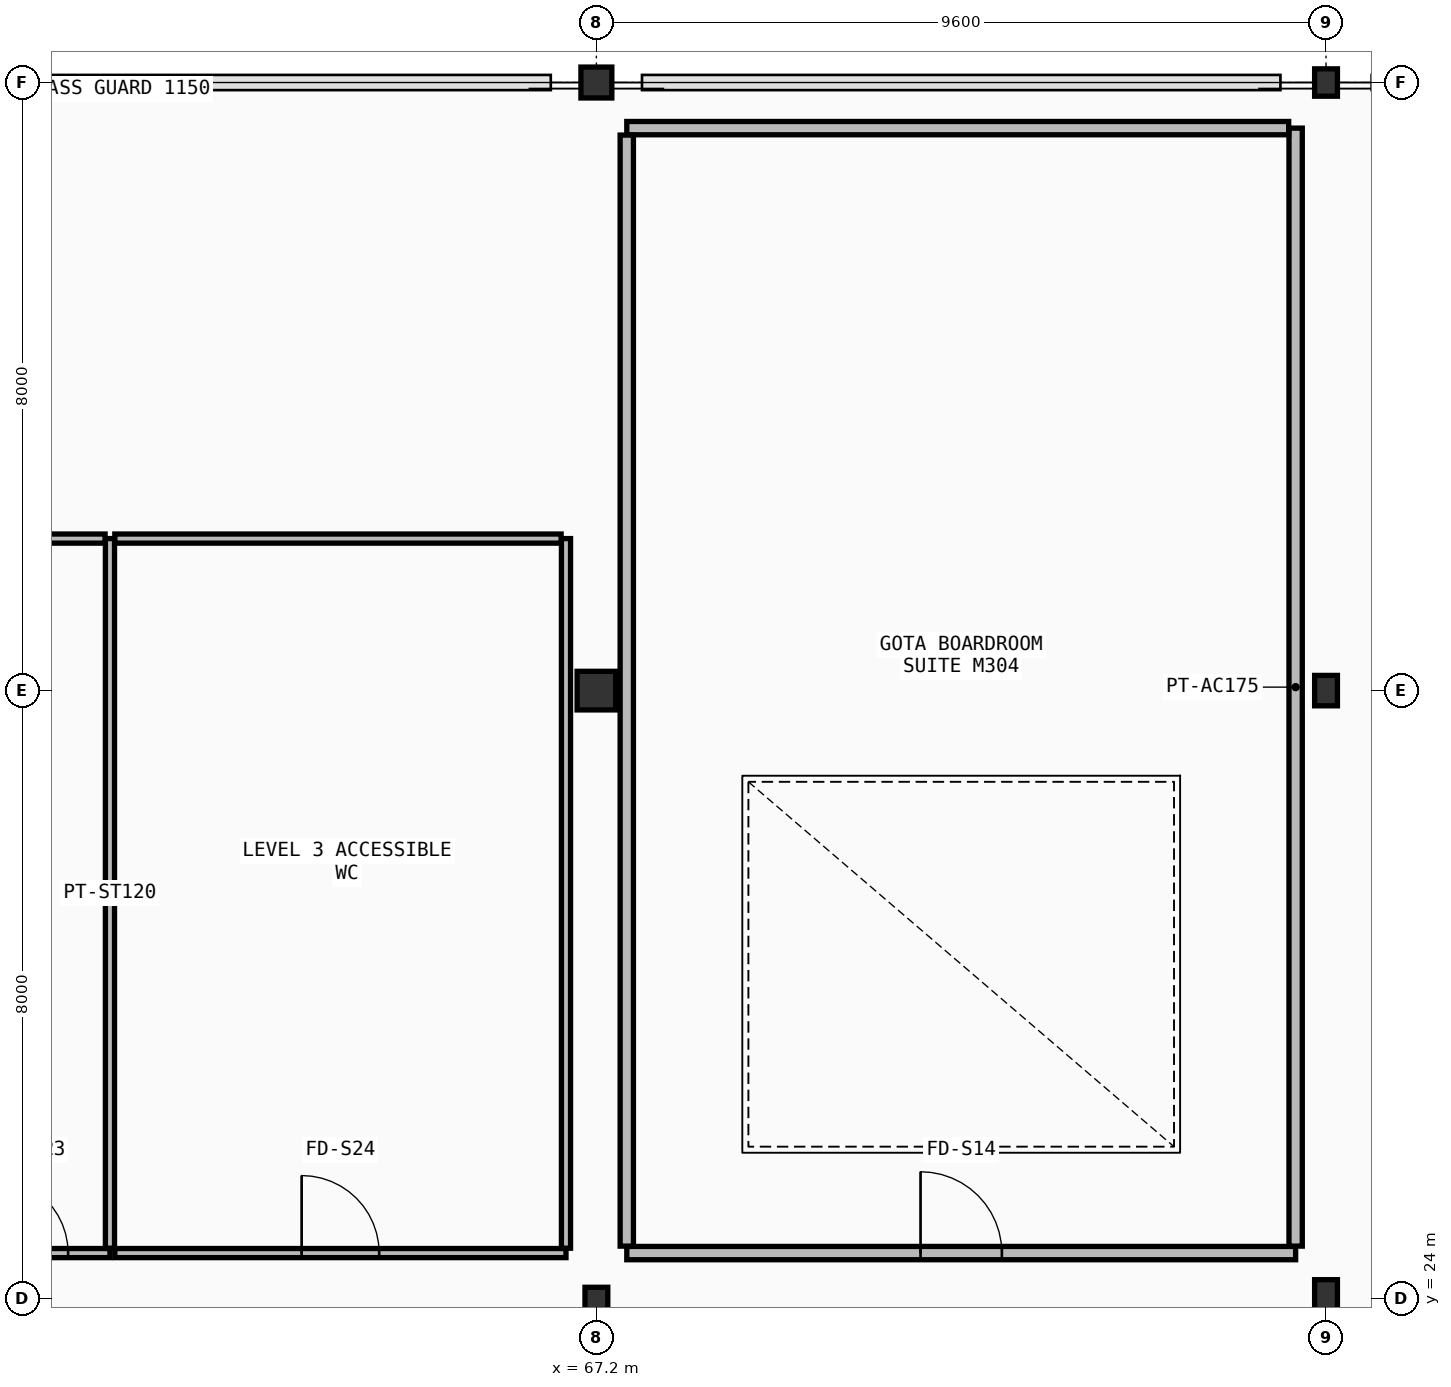
"""IFC4 building model, lengths in metres.
Left out: names, types, materials, properties, quantities, classifications, styles, units other than length and angle.
Written with IfcOpenShell. Run it as: python <this file> out.ifc"""

import sys

from ifc_helpers import new_model, si_unit, direction, frame, frame_2d, origin, origin_2d, place, context, subcontext, project, spatial, rectangle, hollow_circle, i_section, extrude, element, fill, save


model = new_model("IFC4")
c1 = context("Model", 3, precision=1e-05, world=origin(), true_north=direction((0.0, 1.0)))
c2 = subcontext(c1, "Body", "Model", "MODEL_VIEW")
j1 = project(units=[si_unit("LENGTHUNIT", "METRE"), si_unit("PLANEANGLEUNIT", "RADIAN")], contexts=[c1])
p1 = place(None, origin())
s1 = spatial("IfcSite", under=j1, at=p1, CompositionType="ELEMENT")
p2 = place(p1, origin())
s2 = spatial("IfcBuilding", under=s1, at=p2, CompositionType="ELEMENT")
p3 = place(p2, frame((0.0, 0.0, 15.9)))
s3 = spatial("IfcBuildingStorey", under=s2, at=p3, CompositionType="ELEMENT", Elevation=15.9)
p4 = place(p3, frame((67.2, 24.0, 0.0), z_axis=(0.0, 0.0, 1.0), x_axis=(1.0, 0.0, 0.0)))
e1 = element("IfcColumn", 1, at=p4, inside=s3, PredefinedType="COLUMN", context=c2, shape_type="SweptSolid", body=[
    extrude(i_section(OverallWidth=0.3, OverallDepth=0.3, WebThickness=0.011, FlangeThickness=0.019, FilletRadius=0.027, at=origin_2d()), origin(), (0.0, 0.0, 1.0), 4.5),
])
p5 = place(p3, frame((67.2, 32.0, 0.0), z_axis=(0.0, 0.0, 1.0), x_axis=(1.0, 0.0, 0.0)))
e2 = element("IfcColumn", 2, at=p5, inside=s3, PredefinedType="COLUMN", context=c2, shape_type="SweptSolid", body=[
    extrude(hollow_circle(Radius=0.254, WallThickness=0.025, at=origin_2d()), origin(), (0.0, 0.0, 1.0), 4.5),
])
p6 = place(p3, frame((67.2, 40.0, 0.0), z_axis=(0.0, 0.0, 1.0), x_axis=(1.0, 0.0, 0.0)))
e3 = element("IfcColumn", 3, at=p6, inside=s3, PredefinedType="COLUMN", context=c2, shape_type="SweptSolid", body=[
    extrude(hollow_circle(Radius=0.203, WallThickness=0.02, at=origin_2d()), origin(), (0.0, 0.0, 1.0), 4.5),
])
p7 = place(p3, frame((76.8, 24.0, 0.0), z_axis=(0.0, 0.0, 1.0), x_axis=(1.0, 0.0, 0.0)))
e4 = element("IfcColumn", 4, at=p7, inside=s3, PredefinedType="COLUMN", context=c2, shape_type="SweptSolid", body=[
    extrude(i_section(OverallWidth=0.3, OverallDepth=0.5, WebThickness=0.014, FlangeThickness=0.028, FilletRadius=0.027, at=origin_2d()), origin(), (0.0, 0.0, 1.0), 4.5),
])
p8 = place(p3, frame((76.8, 32.0, 0.0), z_axis=(0.0, 0.0, 1.0), x_axis=(1.0, 0.0, 0.0)))
e5 = element("IfcColumn", 5, at=p8, inside=s3, PredefinedType="COLUMN", context=c2, shape_type="SweptSolid", body=[
    extrude(i_section(OverallWidth=0.3, OverallDepth=0.4, WebThickness=0.013, FlangeThickness=0.024, FilletRadius=0.027, at=origin_2d()), origin(), (0.0, 0.0, 1.0), 4.5),
])
p9 = place(p3, frame((76.8, 40.0, 0.0), z_axis=(0.0, 0.0, 1.0), x_axis=(1.0, 0.0, 0.0)))
e6 = element("IfcColumn", 6, at=p9, inside=s3, PredefinedType="COLUMN", context=c2, shape_type="SweptSolid", body=[
    extrude(i_section(OverallWidth=0.3, OverallDepth=0.36, WebThickness=0.012, FlangeThickness=0.022, FilletRadius=0.027, at=origin_2d()), origin(), (0.0, 0.0, 1.0), 4.5),
])
p10 = place(p3, frame((67.6, 24.6, 0.0), z_axis=(0.0, 0.0, 1.0), x_axis=(1.0, 0.0, 0.0)))
e7 = element("IfcWall", 7, at=p10, inside=s3, PredefinedType="PARTITIONING", context=c2, shape_type="SweptSolid", body=[
    extrude(rectangle(XDim=8.8, YDim=0.175, at=frame_2d((4.4, 0.0))), origin(), (0.0, 0.0, 1.0), 4.276),
])
p11 = place(p10, frame((3.865, 0.0, 0.0)))
e8 = element("IfcOpeningElement", 8, at=p11, cuts=e7, PredefinedType="OPENING", context=c2, shape_type="SweptSolid", body=[
    extrude(rectangle(XDim=1.07, YDim=2.26, at=frame_2d((0.535, 1.13))), frame((0.0, 0.097, 0.0), z_axis=(0.0, -1.0, 0.0), x_axis=(1.0, 0.0, 0.0)), (0.0, 0.0, 1.0), 0.195),
])
p12 = place(p3, frame((76.4, 24.691, 0.0), z_axis=(0.0, 0.0, 1.0), x_axis=(0.0, 1.0, 0.0)))
e9 = element("IfcWall", 9, at=p12, inside=s3, PredefinedType="PARTITIONING", context=c2, shape_type="SweptSolid", body=[
    extrude(rectangle(XDim=14.708, YDim=0.175, at=frame_2d((7.354, 0.0))), origin(), (0.0, 0.0, 1.0), 3.746),
])
p13 = place(p3, frame((76.309, 39.4, 0.0), z_axis=(0.0, 0.0, 1.0), x_axis=(-1.0, 0.0, 0.0)))
e10 = element("IfcWall", 10, at=p13, inside=s3, PredefinedType="PARTITIONING", context=c2, shape_type="SweptSolid", body=[
    extrude(rectangle(XDim=8.708, YDim=0.175, at=frame_2d((4.354, 0.0))), origin(), (0.0, 0.0, 1.0), 4.276),
])
p14 = place(p3, frame((67.6, 39.309, 0.0), z_axis=(0.0, 0.0, 1.0), x_axis=(0.0, -1.0, 0.0)))
e11 = element("IfcWall", 11, at=p14, inside=s3, PredefinedType="PARTITIONING", context=c2, shape_type="SweptSolid", body=[
    extrude(rectangle(XDim=14.617, YDim=0.175, at=frame_2d((7.309, 0.0))), origin(), (0.0, 0.0, 1.0), 3.746),
])
p15 = place(p3, frame((54.546, 24.6, 0.0), z_axis=(0.0, 0.0, 1.0), x_axis=(1.0, 0.0, 0.0)))
e12 = element("IfcWall", 12, at=p15, inside=s3, PredefinedType="PARTITIONING", context=c2, shape_type="SweptSolid", body=[
    extrude(rectangle(XDim=6.254, YDim=0.12, at=frame_2d((3.127, 0.0))), origin(), (0.0, 0.0, 1.0), 3.646),
])
p16 = place(p15, frame((4.713, 0.0, 0.0)))
e13 = element("IfcOpeningElement", 13, at=p16, cuts=e12, PredefinedType="OPENING", context=c2, shape_type="SweptSolid", body=[
    extrude(rectangle(XDim=0.99, YDim=2.28, at=frame_2d((0.495, 1.14))), frame((0.0, 0.07, 0.0), z_axis=(0.0, -1.0, 0.0), x_axis=(1.0, 0.0, 0.0)), (0.0, 0.0, 1.0), 0.14),
])
p17 = place(p3, frame((60.8, 24.664, 0.0), z_axis=(0.0, 0.0, 1.0), x_axis=(0.0, 1.0, 0.0)))
e14 = element("IfcWall", 14, at=p17, inside=s3, PredefinedType="PARTITIONING", context=c2, shape_type="SweptSolid", body=[
    extrude(rectangle(XDim=9.336, YDim=0.12, at=frame_2d((4.668, 0.0))), origin(), (0.0, 0.0, 1.0), 3.696),
])
p18 = place(p3, frame((60.736, 34.0, 0.0), z_axis=(0.0, 0.0, 1.0), x_axis=(-1.0, 0.0, 0.0)))
e15 = element("IfcWall", 15, at=p18, inside=s3, PredefinedType="PARTITIONING", context=c2, shape_type="SweptSolid", body=[
    extrude(rectangle(XDim=6.19, YDim=0.12, at=frame_2d((3.095, 0.0))), origin(), (0.0, 0.0, 1.0), 3.746),
])
p19 = place(p3, frame((60.864, 24.6, 0.0), z_axis=(0.0, 0.0, 1.0), x_axis=(1.0, 0.0, 0.0)))
e16 = element("IfcWall", 16, at=p19, inside=s3, PredefinedType="PARTITIONING", context=c2, shape_type="SweptSolid", body=[
    extrude(rectangle(XDim=5.936, YDim=0.12, at=frame_2d((2.968, 0.0))), origin(), (0.0, 0.0, 1.0), 4.276),
])
p20 = place(p19, frame((2.458, 0.0, 0.0)))
e17 = element("IfcOpeningElement", 17, at=p20, cuts=e16, PredefinedType="OPENING", context=c2, shape_type="SweptSolid", body=[
    extrude(rectangle(XDim=1.02, YDim=2.32, at=frame_2d((0.51, 1.16))), frame((0.0, 0.07, 0.0), z_axis=(0.0, -1.0, 0.0), x_axis=(1.0, 0.0, 0.0)), (0.0, 0.0, 1.0), 0.14),
])
p21 = place(p3, frame((66.8, 24.664, 0.0), z_axis=(0.0, 0.0, 1.0), x_axis=(0.0, 1.0, 0.0)))
e18 = element("IfcWall", 18, at=p21, inside=s3, PredefinedType="PARTITIONING", context=c2, shape_type="SweptSolid", body=[
    extrude(rectangle(XDim=9.336, YDim=0.12, at=frame_2d((4.668, 0.0))), origin(), (0.0, 0.0, 1.0), 3.696),
])
p22 = place(p3, frame((66.736, 34.0, 0.0), z_axis=(0.0, 0.0, 1.0), x_axis=(-1.0, 0.0, 0.0)))
e19 = element("IfcWall", 19, at=p22, inside=s3, PredefinedType="PARTITIONING", context=c2, shape_type="SweptSolid", body=[
    extrude(rectangle(XDim=5.872, YDim=0.12, at=frame_2d((2.936, 0.0))), origin(), (0.0, 0.0, 1.0), 4.276),
])
p23 = place(p11, origin())
e20 = element("IfcDoor", 20, at=p23, inside=s3, OperationType="SINGLE_SWING_LEFT", PredefinedType="DOOR", context=c2, shape_type="SweptSolid", body=[
    extrude(rectangle(XDim=1.07, YDim=2.26, at=frame_2d((0.535, 1.13))), frame((0.0, 0.025, 0.0), z_axis=(0.0, -1.0, 0.0), x_axis=(1.0, 0.0, 0.0)), (0.0, 0.0, 1.0), 0.05),
])
fill(e8, e20)
p24 = place(p16, origin())
e21 = element("IfcDoor", 21, at=p24, inside=s3, OperationType="SINGLE_SWING_RIGHT", PredefinedType="DOOR", context=c2, shape_type="SweptSolid", body=[
    extrude(rectangle(XDim=0.99, YDim=2.28, at=frame_2d((0.495, 1.14))), frame((0.0, 0.025, 0.0), z_axis=(0.0, -1.0, 0.0), x_axis=(1.0, 0.0, 0.0)), (0.0, 0.0, 1.0), 0.05),
])
fill(e13, e21)
p25 = place(p20, origin())
e22 = element("IfcDoor", 22, at=p25, inside=s3, OperationType="SINGLE_SWING_LEFT", PredefinedType="DOOR", context=c2, shape_type="SweptSolid", body=[
    extrude(rectangle(XDim=1.02, YDim=2.32, at=frame_2d((0.51, 1.16))), frame((0.0, 0.025, 0.0), z_axis=(0.0, -1.0, 0.0), x_axis=(1.0, 0.0, 0.0)), (0.0, 0.0, 1.0), 0.05),
])
fill(e17, e22)
save(model, sys.argv[1])
